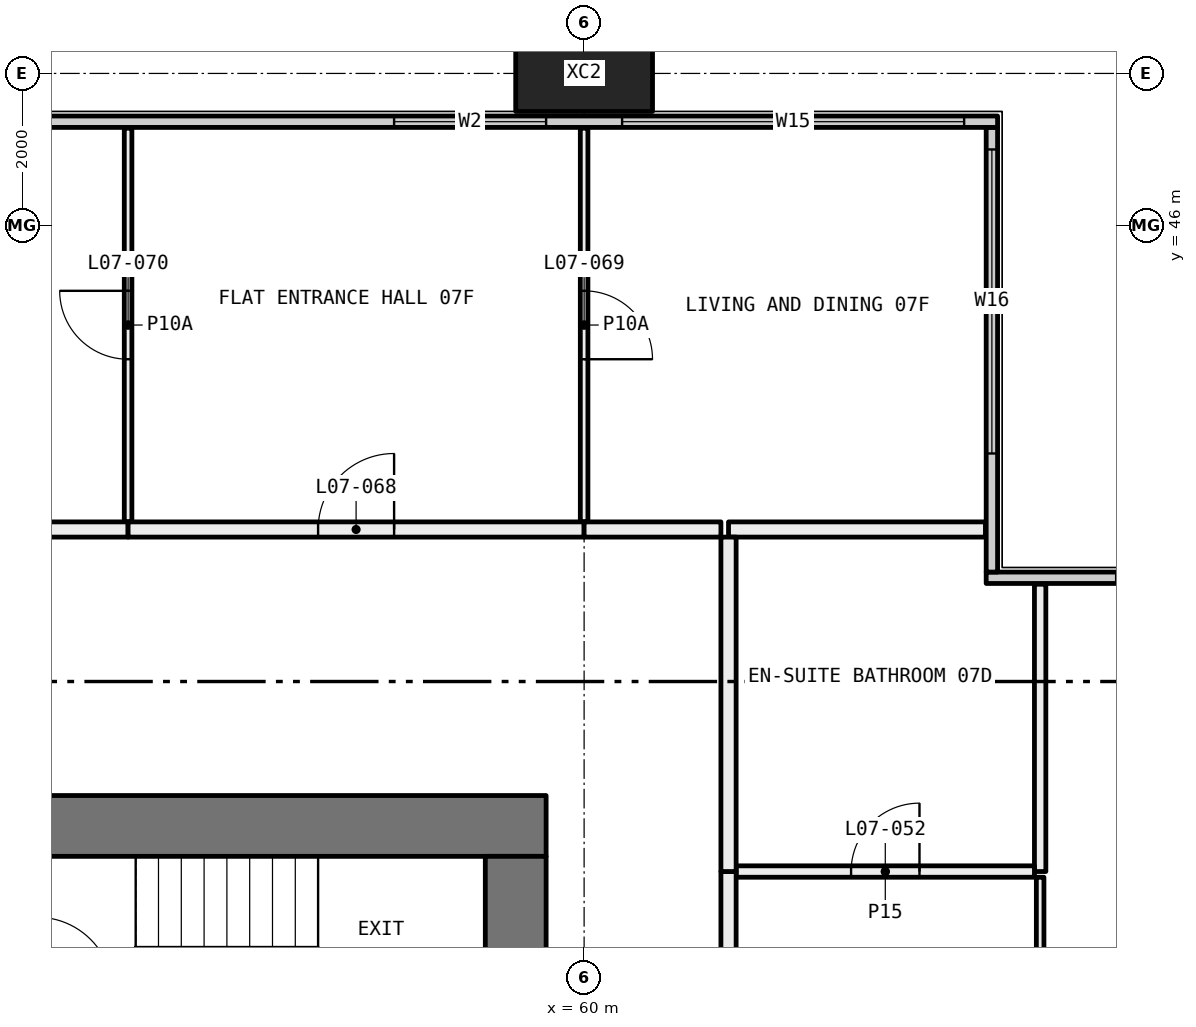
"""IFC4 building model, lengths in metres.
Left out: names, types, materials, properties, quantities, classifications, styles, units other than length and angle.
Written with IfcOpenShell. Run it as: python <this file> out.ifc"""

import sys

from ifc_helpers import new_model, si_unit, direction, frame, frame_2d, origin, origin_2d, place, context, subcontext, project, spatial, rectangle, hollow_rectangle, extrude, element, fill, save


model = new_model("IFC4")
c1 = context("Model", 3, precision=1e-05, world=origin(), true_north=direction((0.0, 1.0)))
c2 = subcontext(c1, "Body", "Model", "MODEL_VIEW")
j1 = project(units=[si_unit("LENGTHUNIT", "METRE"), si_unit("PLANEANGLEUNIT", "RADIAN")], contexts=[c1])
p1 = place(None, origin())
s1 = spatial("IfcSite", under=j1, at=p1, CompositionType="ELEMENT")
p2 = place(p1, origin())
s2 = spatial("IfcBuilding", under=s1, at=p2, CompositionType="ELEMENT")
p3 = place(p2, frame((0.0, 0.0, 36.9)))
s3 = spatial("IfcBuildingStorey", under=s2, at=p3, CompositionType="ELEMENT", Elevation=36.9)
p4 = place(p3, frame((60.0, 48.0, -0.4), z_axis=(0.0, 0.0, 1.0), x_axis=(1.0, 0.0, 0.0)))
e1 = element("IfcColumn", 1, at=p4, inside=s3, PredefinedType="COLUMN", context=c2, shape_type="SweptSolid", body=[
    extrude(hollow_rectangle(XDim=1.8, YDim=1.0, WallThickness=0.07, at=origin_2d()), origin(), (0.0, 0.0, 1.0), 3.45),
])
p5 = place(p3, frame((65.29, 41.365, 0.0), z_axis=(0.0, 0.0, 1.0), x_axis=(1.0, 0.0, 0.0)))
e2 = element("IfcWall", 2, at=p5, inside=s3, PredefinedType="ELEMENTEDWALL", context=c2, shape_type="SweptSolid", body=[
    extrude(rectangle(XDim=6.15, YDim=0.15, at=frame_2d((3.075, 0.0))), origin(), (0.0, 0.0, 1.0), 3.05),
])
p6 = place(p5, frame((1.71, 0.0, 0.45)))
e3 = element("IfcOpeningElement", 3, at=p6, cuts=e2, PredefinedType="OPENING", context=c2, shape_type="SweptSolid", body=[
    extrude(rectangle(XDim=4.0, YDim=2.55, at=frame_2d((2.0, 1.275))), frame((0.0, 0.085, 0.0), z_axis=(0.0, -1.0, 0.0), x_axis=(1.0, 0.0, 0.0)), (0.0, 0.0, 1.0), 0.17),
])
p7 = place(p3, frame((65.365, 41.44, 0.0), z_axis=(0.0, 0.0, 1.0), x_axis=(0.0, 1.0, 0.0)))
e4 = element("IfcWall", 4, at=p7, inside=s3, PredefinedType="ELEMENTEDWALL", context=c2, shape_type="SweptSolid", body=[
    extrude(rectangle(XDim=5.85, YDim=0.15, at=frame_2d((2.925, 0.0))), origin(), (0.0, 0.0, 1.0), 3.05),
])
p8 = place(p7, frame((1.56, 0.0, 0.45)))
e5 = element("IfcOpeningElement", 5, at=p8, cuts=e4, PredefinedType="OPENING", context=c2, shape_type="SweptSolid", body=[
    extrude(rectangle(XDim=4.0, YDim=2.55, at=frame_2d((2.0, 1.275))), frame((0.0, 0.085, 0.0), z_axis=(0.0, -1.0, 0.0), x_axis=(1.0, 0.0, 0.0)), (0.0, 0.0, 1.0), 0.17),
])
p9 = place(p3, frame((6.56, 47.365, 0.0), z_axis=(0.0, 0.0, 1.0), x_axis=(1.0, 0.0, 0.0)))
e6 = element("IfcWall", 6, at=p9, inside=s3, PredefinedType="ELEMENTEDWALL", context=c2, shape_type="SweptSolid", body=[
    extrude(rectangle(XDim=58.88, YDim=0.15, at=frame_2d((29.44, 0.0))), origin(), (0.0, 0.0, 1.0), 3.05),
])
p10 = place(p9, frame((0.44, 0.0, 0.45)))
e7 = element("IfcOpeningElement", 7, at=p10, cuts=e6, PredefinedType="OPENING", context=c2, shape_type="SweptSolid", body=[
    extrude(rectangle(XDim=4.5, YDim=2.55, at=frame_2d((2.25, 1.275))), frame((0.0, 0.085, 0.0), z_axis=(0.0, -1.0, 0.0), x_axis=(1.0, 0.0, 0.0)), (0.0, 0.0, 1.0), 0.17),
])
p11 = place(p9, frame((5.94, 0.0, 0.45)))
e8 = element("IfcOpeningElement", 8, at=p11, cuts=e6, PredefinedType="OPENING", context=c2, shape_type="SweptSolid", body=[
    extrude(rectangle(XDim=3.25, YDim=2.55, at=frame_2d((1.625, 1.275))), frame((0.0, 0.085, 0.0), z_axis=(0.0, -1.0, 0.0), x_axis=(1.0, 0.0, 0.0)), (0.0, 0.0, 1.0), 0.17),
])
p12 = place(p9, frame((13.69, 0.0, 0.45)))
e9 = element("IfcOpeningElement", 9, at=p12, cuts=e6, PredefinedType="OPENING", context=c2, shape_type="SweptSolid", body=[
    extrude(rectangle(XDim=3.25, YDim=2.55, at=frame_2d((1.625, 1.275))), frame((0.0, 0.085, 0.0), z_axis=(0.0, -1.0, 0.0), x_axis=(1.0, 0.0, 0.0)), (0.0, 0.0, 1.0), 0.17),
])
p13 = place(p9, frame((17.94, 0.0, 0.45)))
e10 = element("IfcOpeningElement", 10, at=p13, cuts=e6, PredefinedType="OPENING", context=c2, shape_type="SweptSolid", body=[
    extrude(rectangle(XDim=3.25, YDim=2.55, at=frame_2d((1.625, 1.275))), frame((0.0, 0.085, 0.0), z_axis=(0.0, -1.0, 0.0), x_axis=(1.0, 0.0, 0.0)), (0.0, 0.0, 1.0), 0.17),
])
p14 = place(p9, frame((26.94, 0.0, 0.45)))
e11 = element("IfcOpeningElement", 11, at=p14, cuts=e6, PredefinedType="OPENING", context=c2, shape_type="SweptSolid", body=[
    extrude(rectangle(XDim=2.0, YDim=2.55, at=frame_2d((1.0, 1.275))), frame((0.0, 0.085, 0.0), z_axis=(0.0, -1.0, 0.0), x_axis=(1.0, 0.0, 0.0)), (0.0, 0.0, 1.0), 0.17),
])
p15 = place(p9, frame((29.94, 0.0, 0.45)))
e12 = element("IfcOpeningElement", 12, at=p15, cuts=e6, PredefinedType="OPENING", context=c2, shape_type="SweptSolid", body=[
    extrude(rectangle(XDim=3.25, YDim=2.55, at=frame_2d((1.625, 1.275))), frame((0.0, 0.085, 0.0), z_axis=(0.0, -1.0, 0.0), x_axis=(1.0, 0.0, 0.0)), (0.0, 0.0, 1.0), 0.17),
])
p16 = place(p9, frame((37.69, 0.0, 0.45)))
e13 = element("IfcOpeningElement", 13, at=p16, cuts=e6, PredefinedType="OPENING", context=c2, shape_type="SweptSolid", body=[
    extrude(rectangle(XDim=3.25, YDim=2.55, at=frame_2d((1.625, 1.275))), frame((0.0, 0.085, 0.0), z_axis=(0.0, -1.0, 0.0), x_axis=(1.0, 0.0, 0.0)), (0.0, 0.0, 1.0), 0.17),
])
p17 = place(p9, frame((41.94, 0.0, 0.45)))
e14 = element("IfcOpeningElement", 14, at=p17, cuts=e6, PredefinedType="OPENING", context=c2, shape_type="SweptSolid", body=[
    extrude(rectangle(XDim=3.25, YDim=2.55, at=frame_2d((1.625, 1.275))), frame((0.0, 0.085, 0.0), z_axis=(0.0, -1.0, 0.0), x_axis=(1.0, 0.0, 0.0)), (0.0, 0.0, 1.0), 0.17),
])
p18 = place(p9, frame((50.94, 0.0, 0.45)))
e15 = element("IfcOpeningElement", 15, at=p18, cuts=e6, PredefinedType="OPENING", context=c2, shape_type="SweptSolid", body=[
    extrude(rectangle(XDim=2.0, YDim=2.55, at=frame_2d((1.0, 1.275))), frame((0.0, 0.085, 0.0), z_axis=(0.0, -1.0, 0.0), x_axis=(1.0, 0.0, 0.0)), (0.0, 0.0, 1.0), 0.17),
])
p19 = place(p9, frame((53.94, 0.0, 0.45)))
e16 = element("IfcOpeningElement", 16, at=p19, cuts=e6, PredefinedType="OPENING", context=c2, shape_type="SweptSolid", body=[
    extrude(rectangle(XDim=4.5, YDim=2.55, at=frame_2d((2.25, 1.275))), frame((0.0, 0.085, 0.0), z_axis=(0.0, -1.0, 0.0), x_axis=(1.0, 0.0, 0.0)), (0.0, 0.0, 1.0), 0.17),
])
p20 = place(p3, frame((66.0, 37.425, 0.0), z_axis=(0.0, 0.0, 1.0), x_axis=(0.0, -1.0, 0.0)))
e17 = element("IfcWall", 17, at=p20, inside=s3, PredefinedType="PARTITIONING", context=c2, shape_type="SweptSolid", body=[
    extrude(rectangle(XDim=1.375, YDim=0.1, at=frame_2d((0.688, 0.0))), origin(), (0.0, 0.0, 1.0), 2.45),
])
p21 = place(p3, frame((66.0, 41.28, 0.0), z_axis=(0.0, 0.0, 1.0), x_axis=(0.0, -1.0, 0.0)))
e18 = element("IfcWall", 18, at=p21, inside=s3, PredefinedType="PARTITIONING", context=c2, shape_type="SweptSolid", body=[
    extrude(rectangle(XDim=3.78, YDim=0.15, at=frame_2d((1.89, 0.0))), origin(), (0.0, 0.0, 1.0), 3.05),
])
p22 = place(p3, frame((65.925, 37.5, 0.0), z_axis=(0.0, 0.0, 1.0), x_axis=(-1.0, 0.0, 0.0)))
e19 = element("IfcWall", 19, at=p22, inside=s3, PredefinedType="PARTITIONING", context=c2, shape_type="SweptSolid", body=[
    extrude(rectangle(XDim=3.925, YDim=0.15, at=frame_2d((1.962, 0.0))), origin(), (0.0, 0.0, 1.0), 3.05),
])
p23 = place(p22, frame((1.512, 0.0, 0.0)))
e20 = element("IfcOpeningElement", 20, at=p23, cuts=e19, PredefinedType="OPENING", context=c2, shape_type="SweptSolid", body=[
    extrude(rectangle(XDim=0.9, YDim=2.1, at=frame_2d((0.45, 1.05))), frame((0.0, 0.085, 0.0), z_axis=(0.0, -1.0, 0.0), x_axis=(1.0, 0.0, 0.0)), (0.0, 0.0, 1.0), 0.17),
])
p24 = place(p3, frame((61.9, 37.5, 0.0), z_axis=(0.0, 0.0, 1.0), x_axis=(0.0, -1.0, 0.0)))
e21 = element("IfcWall", 21, at=p24, inside=s3, PredefinedType="PARTITIONING", context=c2, shape_type="SweptSolid", body=[
    extrude(rectangle(XDim=1.6, YDim=0.2, at=frame_2d((0.8, 0.0))), origin(), (0.0, 0.0, 1.0), 2.45),
])
p25 = place(p3, frame((65.28, 42.0, 0.0), z_axis=(0.0, 0.0, 1.0), x_axis=(-1.0, 0.0, 0.0)))
e22 = element("IfcWall", 22, at=p25, inside=s3, PredefinedType="PARTITIONING", context=c2, shape_type="SweptSolid", body=[
    extrude(rectangle(XDim=3.38, YDim=0.2, at=frame_2d((1.69, 0.0))), origin(), (0.0, 0.0, 1.0), 3.05),
])
p26 = place(p3, frame((61.9, 41.9, 0.0), z_axis=(0.0, 0.0, 1.0), x_axis=(0.0, -1.0, 0.0)))
e23 = element("IfcWall", 23, at=p26, inside=s3, PredefinedType="PARTITIONING", context=c2, shape_type="SweptSolid", body=[
    extrude(rectangle(XDim=4.4, YDim=0.2, at=frame_2d((2.2, 0.0))), origin(), (0.0, 0.0, 1.0), 3.05),
])
p27 = place(p3, frame((54.0, 42.1, 0.0), z_axis=(0.0, 0.0, 1.0), x_axis=(0.0, 1.0, 0.0)))
e24 = element("IfcWall", 24, at=p27, inside=s3, PredefinedType="PARTITIONING", context=c2, shape_type="SweptSolid", body=[
    extrude(rectangle(XDim=5.18, YDim=0.1, at=frame_2d((2.59, 0.0))), origin(), (0.0, 0.0, 1.0), 3.05),
])
p28 = place(p27, frame((2.14, 0.0, 0.0)))
e25 = element("IfcOpeningElement", 25, at=p28, cuts=e24, PredefinedType="OPENING", context=c2, shape_type="SweptSolid", body=[
    extrude(rectangle(XDim=0.9, YDim=2.1, at=frame_2d((0.45, 1.05))), frame((0.0, 0.06, 0.0), z_axis=(0.0, -1.0, 0.0), x_axis=(1.0, 0.0, 0.0)), (0.0, 0.0, 1.0), 0.12),
])
p29 = place(p3, frame((48.0, 42.0, 0.0), z_axis=(0.0, 0.0, 1.0), x_axis=(1.0, 0.0, 0.0)))
e26 = element("IfcWall", 26, at=p29, inside=s3, PredefinedType="PARTITIONING", context=c2, shape_type="SweptSolid", body=[
    extrude(rectangle(XDim=6.0, YDim=0.2, at=frame_2d((3.0, 0.0))), origin(), (0.0, 0.0, 1.0), 3.05),
])
p30 = place(p3, frame((60.0, 42.1, 0.0), z_axis=(0.0, 0.0, 1.0), x_axis=(0.0, 1.0, 0.0)))
e27 = element("IfcWall", 27, at=p30, inside=s3, PredefinedType="PARTITIONING", context=c2, shape_type="SweptSolid", body=[
    extrude(rectangle(XDim=5.18, YDim=0.1, at=frame_2d((2.59, 0.0))), origin(), (0.0, 0.0, 1.0), 3.05),
])
p31 = place(p30, frame((2.14, 0.0, 0.0)))
e28 = element("IfcOpeningElement", 28, at=p31, cuts=e27, PredefinedType="OPENING", context=c2, shape_type="SweptSolid", body=[
    extrude(rectangle(XDim=0.9, YDim=2.1, at=frame_2d((0.45, 1.05))), frame((0.0, 0.06, 0.0), z_axis=(0.0, -1.0, 0.0), x_axis=(1.0, 0.0, 0.0)), (0.0, 0.0, 1.0), 0.12),
])
p32 = place(p3, frame((54.0, 42.0, 0.0), z_axis=(0.0, 0.0, 1.0), x_axis=(1.0, 0.0, 0.0)))
e29 = element("IfcWall", 29, at=p32, inside=s3, PredefinedType="PARTITIONING", context=c2, shape_type="SweptSolid", body=[
    extrude(rectangle(XDim=6.0, YDim=0.2, at=frame_2d((3.0, 0.0))), origin(), (0.0, 0.0, 1.0), 3.05),
])
p33 = place(p32, frame((2.5, 0.0, 0.0)))
e30 = element("IfcOpeningElement", 30, at=p33, cuts=e29, PredefinedType="OPENING", context=c2, shape_type="SweptSolid", body=[
    extrude(rectangle(XDim=1.0, YDim=2.1, at=frame_2d((0.5, 1.05))), frame((0.0, 0.11, 0.0), z_axis=(0.0, -1.0, 0.0), x_axis=(1.0, 0.0, 0.0)), (0.0, 0.0, 1.0), 0.22),
])
p34 = place(p3, frame((60.0, 42.0, 0.0), z_axis=(0.0, 0.0, 1.0), x_axis=(1.0, 0.0, 0.0)))
e31 = element("IfcWall", 31, at=p34, inside=s3, PredefinedType="PARTITIONING", context=c2, shape_type="SweptSolid", body=[
    extrude(rectangle(XDim=1.8, YDim=0.2, at=frame_2d((0.9, 0.0))), origin(), (0.0, 0.0, 1.0), 3.05),
])
p35 = place(p3, frame((59.5, 38.1, 0.0), z_axis=(0.0, 0.0, 1.0), x_axis=(-1.0, 0.0, 0.0)))
e32 = element("IfcWall", 32, at=p35, inside=s3, PredefinedType="SHEAR", context=c2, shape_type="SweptSolid", body=[
    extrude(rectangle(XDim=11.0, YDim=0.8, at=frame_2d((5.5, 0.0))), origin(), (0.0, 0.0, 1.0), 3.05),
])
p36 = place(p35, frame((8.4, 0.0, 0.0)))
e33 = element("IfcOpeningElement", 33, at=p36, cuts=e32, PredefinedType="OPENING", context=c2, shape_type="SweptSolid", body=[
    extrude(rectangle(XDim=1.6, YDim=2.1, at=frame_2d((0.8, 1.05))), frame((0.0, 0.41, 0.0), z_axis=(0.0, -1.0, 0.0), x_axis=(1.0, 0.0, 0.0)), (0.0, 0.0, 1.0), 0.82),
])
p37 = place(p3, frame((59.1, 22.3, 0.0), z_axis=(0.0, 0.0, 1.0), x_axis=(0.0, 1.0, 0.0)))
e34 = element("IfcWall", 34, at=p37, inside=s3, PredefinedType="SHEAR", context=c2, shape_type="SweptSolid", body=[
    extrude(rectangle(XDim=15.4, YDim=0.8, at=frame_2d((7.7, 0.0))), origin(), (0.0, 0.0, 1.0), 3.05),
])
p38 = place(p37, frame((8.15, 0.0, 0.0)))
e35 = element("IfcOpeningElement", 35, at=p38, cuts=e34, PredefinedType="OPENING", context=c2, shape_type="SweptSolid", body=[
    extrude(rectangle(XDim=1.6, YDim=2.1, at=frame_2d((0.8, 1.05))), frame((0.0, 0.41, 0.0), z_axis=(0.0, -1.0, 0.0), x_axis=(1.0, 0.0, 0.0)), (0.0, 0.0, 1.0), 0.82),
])
p39 = place(p37, frame((2.05, 0.0, 0.0)))
e36 = element("IfcOpeningElement", 36, at=p39, cuts=e34, PredefinedType="OPENING", context=c2, shape_type="SweptSolid", body=[
    extrude(rectangle(XDim=1.0, YDim=2.1, at=frame_2d((0.5, 1.05))), frame((0.0, 0.41, 0.0), z_axis=(0.0, -1.0, 0.0), x_axis=(1.0, 0.0, 0.0)), (0.0, 0.0, 1.0), 0.82),
])
p40 = place(p8, origin())
e37 = element("IfcWindow", 37, at=p40, inside=s3, PartitioningType="SINGLE_PANEL", PredefinedType="WINDOW", context=c2, shape_type="SweptSolid", body=[
    extrude(rectangle(XDim=4.0, YDim=2.55, at=frame_2d((2.0, 1.275))), frame((0.0, 0.03, 0.0), z_axis=(0.0, -1.0, 0.0), x_axis=(1.0, 0.0, 0.0)), (0.0, 0.0, 1.0), 0.06),
])
fill(e5, e37)
p41 = place(p18, origin())
e38 = element("IfcWindow", 38, at=p41, inside=s3, PartitioningType="SINGLE_PANEL", PredefinedType="WINDOW", context=c2, shape_type="SweptSolid", body=[
    extrude(rectangle(XDim=2.0, YDim=2.55, at=frame_2d((1.0, 1.275))), frame((0.0, 0.03, 0.0), z_axis=(0.0, -1.0, 0.0), x_axis=(1.0, 0.0, 0.0)), (0.0, 0.0, 1.0), 0.06),
])
fill(e15, e38)
p42 = place(p19, origin())
e39 = element("IfcWindow", 39, at=p42, inside=s3, PartitioningType="SINGLE_PANEL", PredefinedType="WINDOW", context=c2, shape_type="SweptSolid", body=[
    extrude(rectangle(XDim=4.5, YDim=2.55, at=frame_2d((2.25, 1.275))), frame((0.0, 0.03, 0.0), z_axis=(0.0, -1.0, 0.0), x_axis=(1.0, 0.0, 0.0)), (0.0, 0.0, 1.0), 0.06),
])
fill(e16, e39)
p43 = place(p23, frame((0.9, 0.0, 0.0), x_axis=(-1.0, 0.0, 0.0)))
e40 = element("IfcDoor", 40, at=p43, inside=s3, OperationType="SINGLE_SWING_LEFT", PredefinedType="DOOR", context=c2, shape_type="SweptSolid", body=[
    extrude(rectangle(XDim=0.9, YDim=2.1, at=frame_2d((0.45, 1.05))), frame((0.0, 0.025, 0.0), z_axis=(0.0, -1.0, 0.0), x_axis=(1.0, 0.0, 0.0)), (0.0, 0.0, 1.0), 0.05),
])
fill(e20, e40)
p44 = place(p33, origin())
e41 = element("IfcDoor", 41, at=p44, inside=s3, OperationType="SINGLE_SWING_LEFT", PredefinedType="DOOR", context=c2, shape_type="SweptSolid", body=[
    extrude(rectangle(XDim=1.0, YDim=2.1, at=frame_2d((0.5, 1.05))), frame((0.0, 0.025, 0.0), z_axis=(0.0, -1.0, 0.0), x_axis=(1.0, 0.0, 0.0)), (0.0, 0.0, 1.0), 0.05),
])
fill(e30, e41)
p45 = place(p31, frame((0.9, 0.0, 0.0), x_axis=(-1.0, 0.0, 0.0)))
e42 = element("IfcDoor", 42, at=p45, inside=s3, OperationType="SINGLE_SWING_LEFT", PredefinedType="DOOR", context=c2, shape_type="SweptSolid", body=[
    extrude(rectangle(XDim=0.9, YDim=2.1, at=frame_2d((0.45, 1.05))), frame((0.0, 0.025, 0.0), z_axis=(0.0, -1.0, 0.0), x_axis=(1.0, 0.0, 0.0)), (0.0, 0.0, 1.0), 0.05),
])
fill(e28, e42)
p46 = place(p28, origin())
e43 = element("IfcDoor", 43, at=p46, inside=s3, OperationType="SINGLE_SWING_LEFT", PredefinedType="DOOR", context=c2, shape_type="SweptSolid", body=[
    extrude(rectangle(XDim=0.9, YDim=2.1, at=frame_2d((0.45, 1.05))), frame((0.0, 0.025, 0.0), z_axis=(0.0, -1.0, 0.0), x_axis=(1.0, 0.0, 0.0)), (0.0, 0.0, 1.0), 0.05),
])
fill(e25, e43)
save(model, sys.argv[1])
